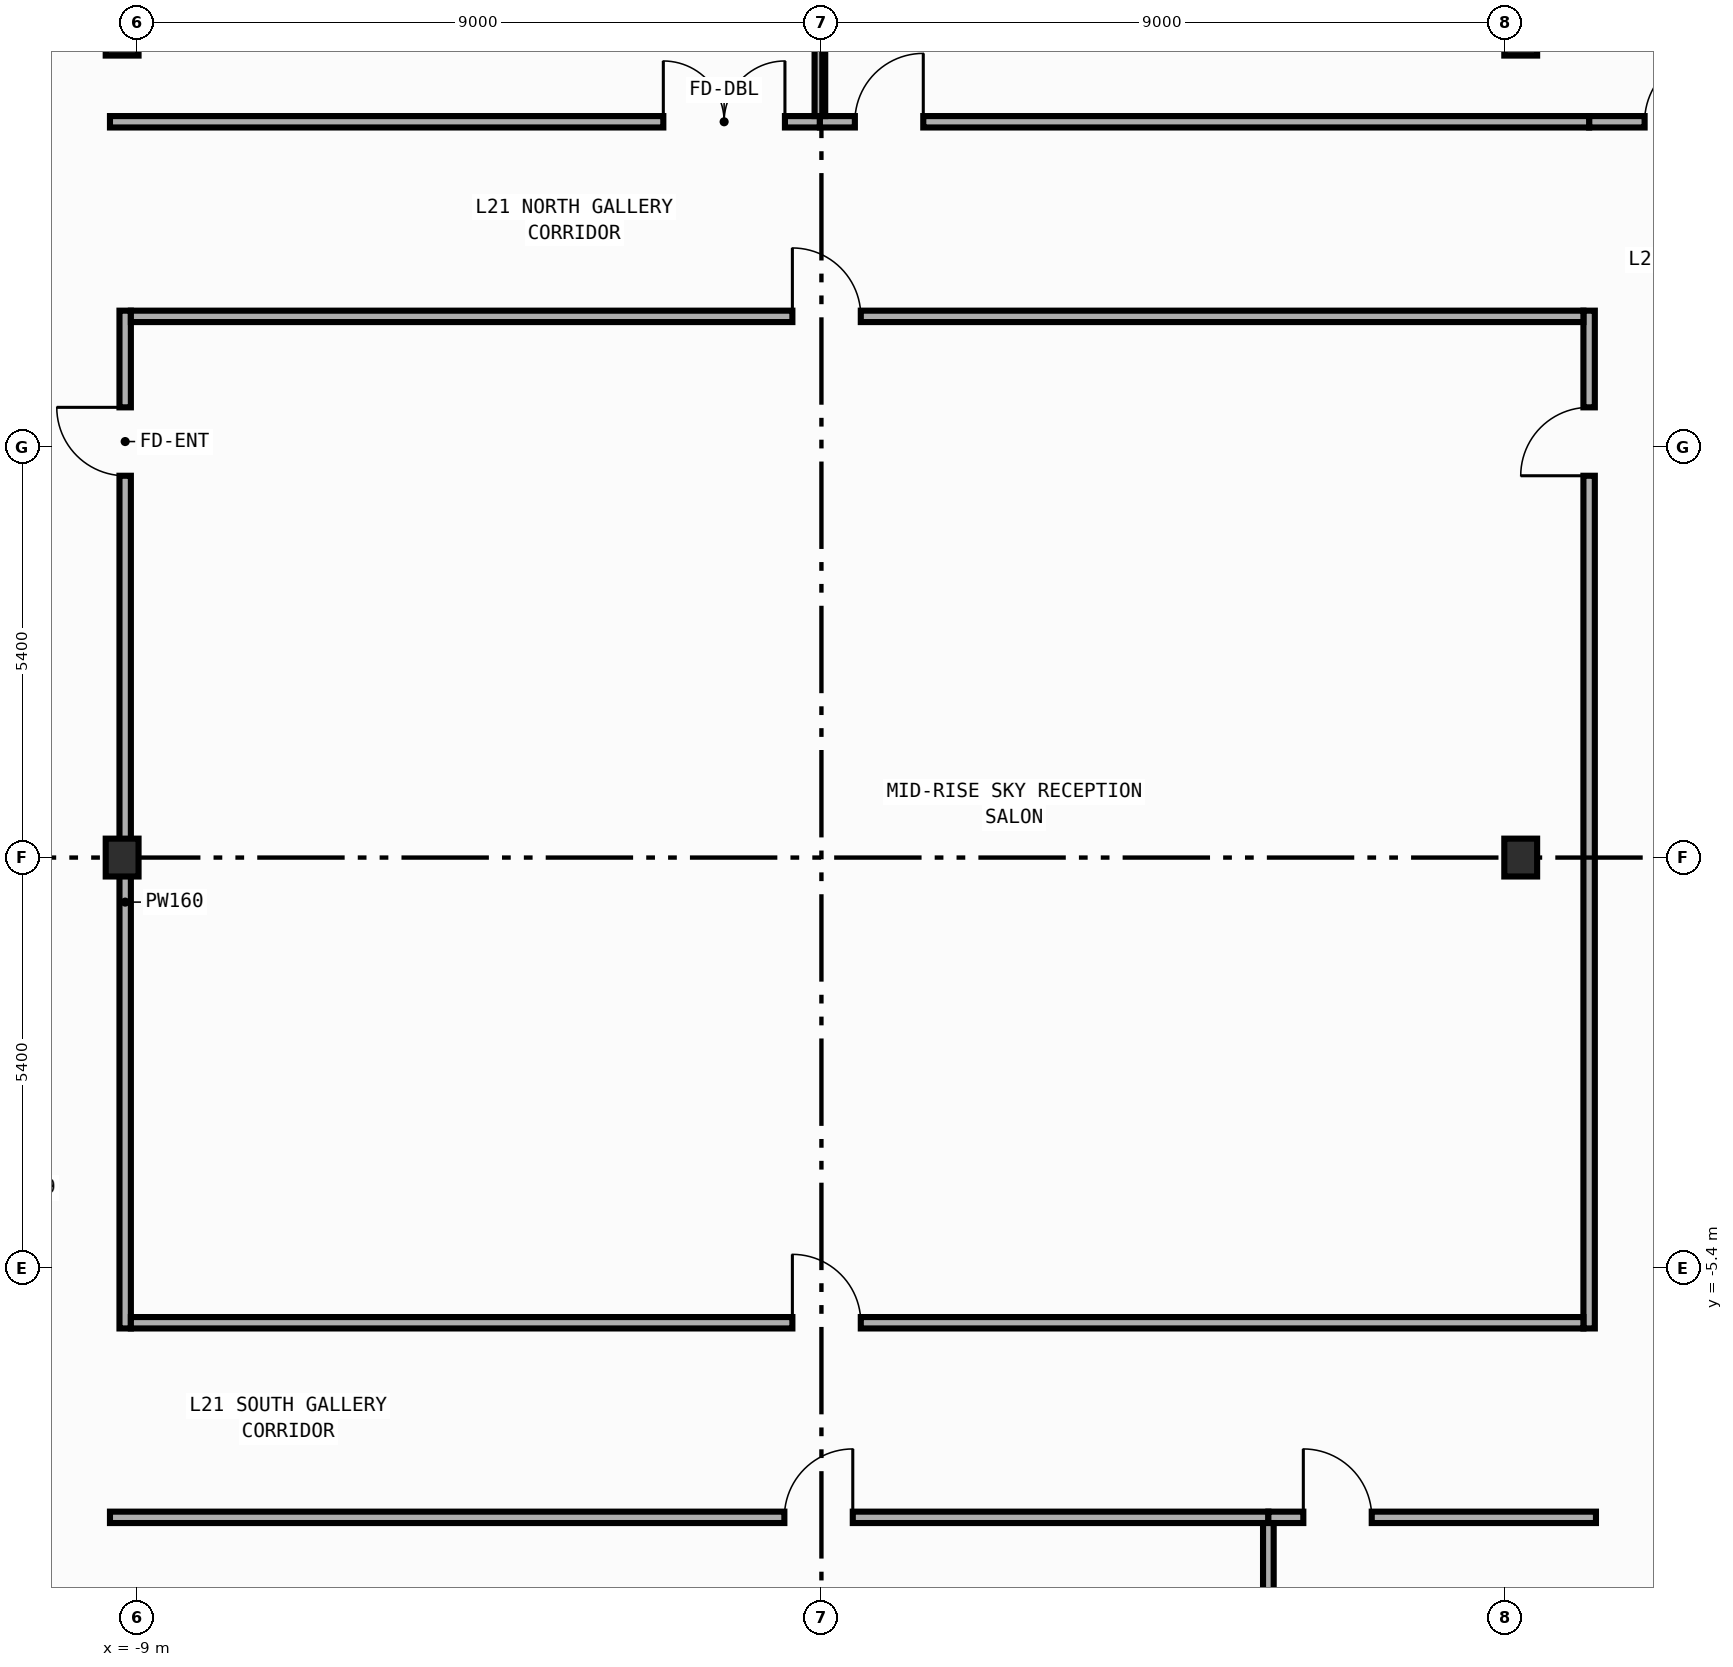
"""IFC4 building model, lengths in metres.
Left out: names, types, materials, properties, quantities, classifications, styles, units other than length and angle.
Written with IfcOpenShell. Run it as: python <this file> out.ifc"""

import sys

from ifc_helpers import new_model, si_unit, direction, frame, frame_2d, origin, origin_2d, place, context, subcontext, project, spatial, rectangle, i_section, extrude, element, fill, save


model = new_model("IFC4")
c1 = context("Model", 3, precision=1e-05, world=origin(), true_north=direction((0.0, 1.0)))
c2 = subcontext(c1, "Body", "Model", "MODEL_VIEW")
j1 = project(units=[si_unit("LENGTHUNIT", "METRE"), si_unit("PLANEANGLEUNIT", "RADIAN")], contexts=[c1])
p1 = place(None, origin())
s1 = spatial("IfcSite", under=j1, at=p1, CompositionType="ELEMENT")
p2 = place(p1, origin())
s2 = spatial("IfcBuilding", under=s1, at=p2, CompositionType="ELEMENT")
p3 = place(p2, frame((0.0, 0.0, 93.2)))
s3 = spatial("IfcBuildingStorey", under=s2, at=p3, CompositionType="ELEMENT", Elevation=93.2)
for number, where, z_axis, x_axis in (
    (1, (-9.2, 0.0, 0.0), (0.0, 0.0, 1.0), (1.0, 0.0, 0.0)),
    (2, (-9.2, 10.8, 0.0), (0.0, 0.0, 1.0), (1.0, 0.0, 0.0)),
    (3, (9.2, 0.0, 0.0), (0.0, 0.0, 1.0), (1.0, 0.0, 0.0)),
    (4, (9.2, 10.8, 0.0), (0.0, 0.0, 1.0), (1.0, 0.0, 0.0)),
):
    element("IfcColumn", number, at=place(p3, frame(where, z_axis=z_axis, x_axis=x_axis)), inside=s3, PredefinedType="COLUMN", context=c2, shape_type="SweptSolid", body=[
        extrude(i_section(OverallWidth=0.432, OverallDepth=0.498, WebThickness=0.045, FlangeThickness=0.07, FilletRadius=0.022, at=origin_2d()), origin(), (0.0, 0.0, 1.0), 4.2),
    ])
p4 = place(p3, frame((-9.16, -6.195, 0.0), z_axis=(0.0, 0.0, 1.0), x_axis=(0.0, 1.0, 0.0)))
e5 = element("IfcWall", 5, at=p4, inside=s3, PredefinedType="PARTITIONING", context=c2, shape_type="SweptSolid", body=[
    extrude(rectangle(XDim=13.39, YDim=0.15, at=frame_2d((6.695, 0.0))), origin(), (0.0, 0.0, 1.0), 3.24),
])
p5 = place(p4, frame((11.218, 0.0, 0.0)))
e6 = element("IfcOpeningElement", 6, at=p5, cuts=e5, PredefinedType="OPENING", context=c2, shape_type="SweptSolid", body=[
    extrude(rectangle(XDim=0.9, YDim=2.15, at=frame_2d((0.45, 1.075))), frame((0.0, 0.085, 0.0), z_axis=(0.0, -1.0, 0.0), x_axis=(1.0, 0.0, 0.0)), (0.0, 0.0, 1.0), 0.17),
])
p6 = place(p3, frame((10.1, -6.195, 0.0), z_axis=(0.0, 0.0, 1.0), x_axis=(0.0, 1.0, 0.0)))
e7 = element("IfcWall", 7, at=p6, inside=s3, PredefinedType="PARTITIONING", context=c2, shape_type="SweptSolid", body=[
    extrude(rectangle(XDim=13.39, YDim=0.15, at=frame_2d((6.695, 0.0))), origin(), (0.0, 0.0, 1.0), 3.94),
])
p7 = place(p6, frame((11.218, 0.0, 0.0)))
e8 = element("IfcOpeningElement", 8, at=p7, cuts=e7, PredefinedType="OPENING", context=c2, shape_type="SweptSolid", body=[
    extrude(rectangle(XDim=0.9, YDim=2.15, at=frame_2d((0.45, 1.075))), frame((0.0, 0.085, 0.0), z_axis=(0.0, -1.0, 0.0), x_axis=(1.0, 0.0, 0.0)), (0.0, 0.0, 1.0), 0.17),
])
p8 = place(p3, frame((10.1, 9.68, 0.0), z_axis=(0.0, 0.0, 1.0), x_axis=(1.0, 0.0, 0.0)))
e9 = element("IfcWall", 9, at=p8, inside=s3, PredefinedType="PARTITIONING", context=c2, shape_type="SweptSolid", body=[
    extrude(rectangle(XDim=2.09, YDim=0.15, at=frame_2d((1.045, 0.0))), origin(), (0.0, 0.0, 1.0), 3.94),
])
p9 = place(p8, frame((0.73, 0.0, 0.0)))
e10 = element("IfcOpeningElement", 10, at=p9, cuts=e9, PredefinedType="OPENING", context=c2, shape_type="SweptSolid", body=[
    extrude(rectangle(XDim=0.9, YDim=2.15, at=frame_2d((0.45, 1.075))), frame((0.0, 0.085, 0.0), z_axis=(0.0, -1.0, 0.0), x_axis=(1.0, 0.0, 0.0)), (0.0, 0.0, 1.0), 0.17),
])
p10 = place(p3, frame((-9.085, 7.12, 0.0), z_axis=(0.0, 0.0, 1.0), x_axis=(1.0, 0.0, 0.0)))
e11 = element("IfcWall", 11, at=p10, inside=s3, PredefinedType="PARTITIONING", context=c2, shape_type="SweptSolid", body=[
    extrude(rectangle(XDim=19.11, YDim=0.15, at=frame_2d((9.555, 0.0))), origin(), (0.0, 0.0, 1.0), 3.94),
])
p11 = place(p10, frame((8.703, 0.0, 0.0)))
e12 = element("IfcOpeningElement", 12, at=p11, cuts=e11, PredefinedType="OPENING", context=c2, shape_type="SweptSolid", body=[
    extrude(rectangle(XDim=0.9, YDim=2.15, at=frame_2d((0.45, 1.075))), frame((0.0, 0.085, 0.0), z_axis=(0.0, -1.0, 0.0), x_axis=(1.0, 0.0, 0.0)), (0.0, 0.0, 1.0), 0.17),
])
p12 = place(p3, frame((-9.36, 9.68, 0.0), z_axis=(0.0, 0.0, 1.0), x_axis=(1.0, 0.0, 0.0)))
e13 = element("IfcWall", 13, at=p12, inside=s3, PredefinedType="PARTITIONING", context=c2, shape_type="SweptSolid", body=[
    extrude(rectangle(XDim=9.34, YDim=0.15, at=frame_2d((4.67, 0.0))), origin(), (0.0, 0.0, 1.0), 3.94),
])
p13 = place(p12, frame((7.28, 0.0, 0.0)))
e14 = element("IfcOpeningElement", 14, at=p13, cuts=e13, PredefinedType="OPENING", context=c2, shape_type="SweptSolid", body=[
    extrude(rectangle(XDim=1.6, YDim=2.25, at=frame_2d((0.8, 1.125))), frame((0.0, 0.085, 0.0), z_axis=(0.0, -1.0, 0.0), x_axis=(1.0, 0.0, 0.0)), (0.0, 0.0, 1.0), 0.17),
])
p14 = place(p3, frame((-0.02, 9.68, 0.0), z_axis=(0.0, 0.0, 1.0), x_axis=(1.0, 0.0, 0.0)))
e15 = element("IfcWall", 15, at=p14, inside=s3, PredefinedType="PARTITIONING", context=c2, shape_type="SweptSolid", body=[
    extrude(rectangle(XDim=10.12, YDim=0.15, at=frame_2d((5.06, 0.0))), origin(), (0.0, 0.0, 1.0), 3.94),
])
p15 = place(p14, frame((0.46, 0.0, 0.0)))
e16 = element("IfcOpeningElement", 16, at=p15, cuts=e15, PredefinedType="OPENING", context=c2, shape_type="SweptSolid", body=[
    extrude(rectangle(XDim=0.9, YDim=2.15, at=frame_2d((0.45, 1.075))), frame((0.0, 0.085, 0.0), z_axis=(0.0, -1.0, 0.0), x_axis=(1.0, 0.0, 0.0)), (0.0, 0.0, 1.0), 0.17),
])
p16 = place(p3, frame((-9.085, -6.12, 0.0), z_axis=(0.0, 0.0, 1.0), x_axis=(1.0, 0.0, 0.0)))
e17 = element("IfcWall", 17, at=p16, inside=s3, PredefinedType="PARTITIONING", context=c2, shape_type="SweptSolid", body=[
    extrude(rectangle(XDim=19.11, YDim=0.15, at=frame_2d((9.555, 0.0))), origin(), (0.0, 0.0, 1.0), 3.94),
])
p17 = place(p16, frame((8.703, 0.0, 0.0)))
e18 = element("IfcOpeningElement", 18, at=p17, cuts=e17, PredefinedType="OPENING", context=c2, shape_type="SweptSolid", body=[
    extrude(rectangle(XDim=0.9, YDim=2.15, at=frame_2d((0.45, 1.075))), frame((0.0, 0.085, 0.0), z_axis=(0.0, -1.0, 0.0), x_axis=(1.0, 0.0, 0.0)), (0.0, 0.0, 1.0), 0.17),
])
p18 = place(p3, frame((-9.36, -8.68, 0.0), z_axis=(0.0, 0.0, 1.0), x_axis=(1.0, 0.0, 0.0)))
e19 = element("IfcWall", 19, at=p18, inside=s3, PredefinedType="PARTITIONING", context=c2, shape_type="SweptSolid", body=[
    extrude(rectangle(XDim=15.24, YDim=0.15, at=frame_2d((7.62, 0.0))), origin(), (0.0, 0.0, 1.0), 3.94),
])
p19 = place(p18, frame((8.873, 0.0, 0.0)))
e20 = element("IfcOpeningElement", 20, at=p19, cuts=e19, PredefinedType="OPENING", context=c2, shape_type="SweptSolid", body=[
    extrude(rectangle(XDim=0.9, YDim=2.15, at=frame_2d((0.45, 1.075))), frame((0.0, 0.085, 0.0), z_axis=(0.0, -1.0, 0.0), x_axis=(1.0, 0.0, 0.0)), (0.0, 0.0, 1.0), 0.17),
])
p20 = place(p3, frame((5.88, -8.68, 0.0), z_axis=(0.0, 0.0, 1.0), x_axis=(1.0, 0.0, 0.0)))
e21 = element("IfcWall", 21, at=p20, inside=s3, PredefinedType="PARTITIONING", context=c2, shape_type="SweptSolid", body=[
    extrude(rectangle(XDim=4.31, YDim=0.15, at=frame_2d((2.155, 0.0))), origin(), (0.0, 0.0, 1.0), 3.94),
])
p21 = place(p20, frame((0.46, 0.0, 0.0)))
e22 = element("IfcOpeningElement", 22, at=p21, cuts=e21, PredefinedType="OPENING", context=c2, shape_type="SweptSolid", body=[
    extrude(rectangle(XDim=0.9, YDim=2.15, at=frame_2d((0.45, 1.075))), frame((0.0, 0.085, 0.0), z_axis=(0.0, -1.0, 0.0), x_axis=(1.0, 0.0, 0.0)), (0.0, 0.0, 1.0), 0.17),
])
p22 = place(p3, frame((-0.02, 9.755, 0.0), z_axis=(0.0, 0.0, 1.0), x_axis=(0.0, 1.0, 0.0)))
e23 = element("IfcWall", 23, at=p22, inside=s3, PredefinedType="PARTITIONING", context=c2, shape_type="SweptSolid", body=[
    extrude(rectangle(XDim=16.4, YDim=0.14, at=frame_2d((8.2, 0.0))), origin(), (0.0, 0.0, 1.0), 3.94),
])
p23 = place(p3, frame((5.88, -26.038, 0.0), z_axis=(0.0, 0.0, 1.0), x_axis=(0.0, 1.0, 0.0)))
e24 = element("IfcWall", 24, at=p23, inside=s3, PredefinedType="PARTITIONING", context=c2, shape_type="SweptSolid", body=[
    extrude(rectangle(XDim=17.283, YDim=0.14, at=frame_2d((8.642, 0.0))), origin(), (0.0, 0.0, 1.0), 3.94),
])
p24 = place(p5, origin())
e25 = element("IfcDoor", 25, at=p24, inside=s3, OperationType="SINGLE_SWING_RIGHT", PredefinedType="DOOR", context=c2, shape_type="SweptSolid", body=[
    extrude(rectangle(XDim=0.9, YDim=2.15, at=frame_2d((0.45, 1.075))), frame((0.0, 0.025, 0.0), z_axis=(0.0, -1.0, 0.0), x_axis=(1.0, 0.0, 0.0)), (0.0, 0.0, 1.0), 0.05),
])
fill(e6, e25)
p25 = place(p7, origin())
e26 = element("IfcDoor", 26, at=p25, inside=s3, OperationType="SINGLE_SWING_LEFT", PredefinedType="DOOR", context=c2, shape_type="SweptSolid", body=[
    extrude(rectangle(XDim=0.9, YDim=2.15, at=frame_2d((0.45, 1.075))), frame((0.0, 0.025, 0.0), z_axis=(0.0, -1.0, 0.0), x_axis=(1.0, 0.0, 0.0)), (0.0, 0.0, 1.0), 0.05),
])
fill(e8, e26)
p26 = place(p9, origin())
e27 = element("IfcDoor", 27, at=p26, inside=s3, OperationType="SINGLE_SWING_RIGHT", PredefinedType="DOOR", context=c2, shape_type="SweptSolid", body=[
    extrude(rectangle(XDim=0.9, YDim=2.15, at=frame_2d((0.45, 1.075))), frame((0.0, 0.025, 0.0), z_axis=(0.0, -1.0, 0.0), x_axis=(1.0, 0.0, 0.0)), (0.0, 0.0, 1.0), 0.05),
])
fill(e10, e27)
p27 = place(p11, origin())
e28 = element("IfcDoor", 28, at=p27, inside=s3, OperationType="SINGLE_SWING_LEFT", PredefinedType="DOOR", context=c2, shape_type="SweptSolid", body=[
    extrude(rectangle(XDim=0.9, YDim=2.15, at=frame_2d((0.45, 1.075))), frame((0.0, 0.025, 0.0), z_axis=(0.0, -1.0, 0.0), x_axis=(1.0, 0.0, 0.0)), (0.0, 0.0, 1.0), 0.05),
])
fill(e12, e28)
p28 = place(p13, origin())
e29 = element("IfcDoor", 29, at=p28, inside=s3, OperationType="DOUBLE_DOOR_SINGLE_SWING", PredefinedType="DOOR", context=c2, shape_type="SweptSolid", body=[
    extrude(rectangle(XDim=1.6, YDim=2.25, at=frame_2d((0.8, 1.125))), frame((0.0, 0.025, 0.0), z_axis=(0.0, -1.0, 0.0), x_axis=(1.0, 0.0, 0.0)), (0.0, 0.0, 1.0), 0.05),
])
fill(e14, e29)
p29 = place(p15, origin())
e30 = element("IfcDoor", 30, at=p29, inside=s3, OperationType="SINGLE_SWING_RIGHT", PredefinedType="DOOR", context=c2, shape_type="SweptSolid", body=[
    extrude(rectangle(XDim=0.9, YDim=2.15, at=frame_2d((0.45, 1.075))), frame((0.0, 0.025, 0.0), z_axis=(0.0, -1.0, 0.0), x_axis=(1.0, 0.0, 0.0)), (0.0, 0.0, 1.0), 0.05),
])
fill(e16, e30)
p30 = place(p17, origin())
e31 = element("IfcDoor", 31, at=p30, inside=s3, OperationType="SINGLE_SWING_LEFT", PredefinedType="DOOR", context=c2, shape_type="SweptSolid", body=[
    extrude(rectangle(XDim=0.9, YDim=2.15, at=frame_2d((0.45, 1.075))), frame((0.0, 0.025, 0.0), z_axis=(0.0, -1.0, 0.0), x_axis=(1.0, 0.0, 0.0)), (0.0, 0.0, 1.0), 0.05),
])
fill(e18, e31)
p31 = place(p19, origin())
e32 = element("IfcDoor", 32, at=p31, inside=s3, OperationType="SINGLE_SWING_RIGHT", PredefinedType="DOOR", context=c2, shape_type="SweptSolid", body=[
    extrude(rectangle(XDim=0.9, YDim=2.15, at=frame_2d((0.45, 1.075))), frame((0.0, 0.025, 0.0), z_axis=(0.0, -1.0, 0.0), x_axis=(1.0, 0.0, 0.0)), (0.0, 0.0, 1.0), 0.05),
])
fill(e20, e32)
p32 = place(p21, origin())
e33 = element("IfcDoor", 33, at=p32, inside=s3, OperationType="SINGLE_SWING_LEFT", PredefinedType="DOOR", context=c2, shape_type="SweptSolid", body=[
    extrude(rectangle(XDim=0.9, YDim=2.15, at=frame_2d((0.45, 1.075))), frame((0.0, 0.025, 0.0), z_axis=(0.0, -1.0, 0.0), x_axis=(1.0, 0.0, 0.0)), (0.0, 0.0, 1.0), 0.05),
])
fill(e22, e33)
save(model, sys.argv[1])
